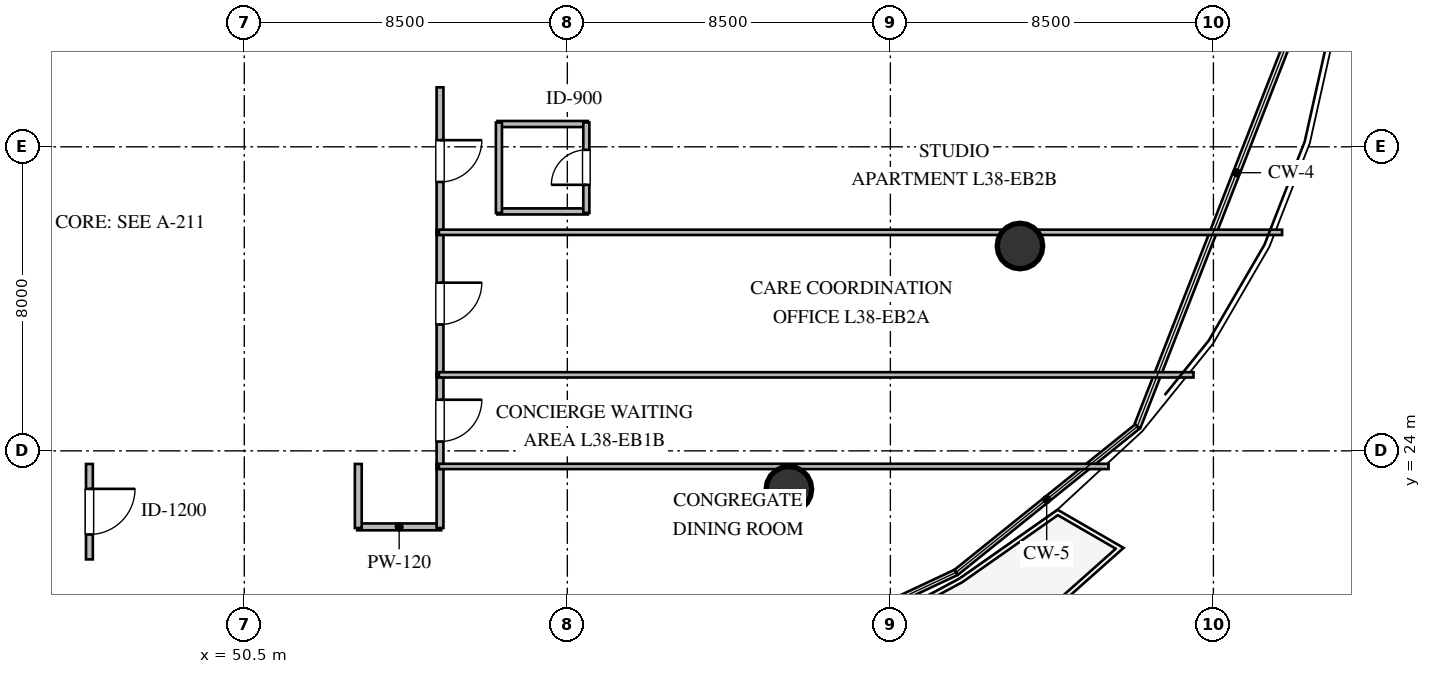
"""IFC4 building model, lengths in metres.
Left out: names, types, materials, properties, quantities, classifications, styles, units other than length and angle.
Written with IfcOpenShell. Run it as: python <this file> out.ifc"""

import sys

from ifc_helpers import new_model, si_unit, direction, frame, frame_2d, origin, origin_2d, place, context, subcontext, project, spatial, rectangle, circle, extrude, element, fill, save


model = new_model("IFC4")
c1 = context("Model", 3, precision=1e-05, world=origin(), true_north=direction((0.0, 1.0)))
c2 = subcontext(c1, "Body", "Model", "MODEL_VIEW")
j1 = project(units=[si_unit("LENGTHUNIT", "METRE"), si_unit("PLANEANGLEUNIT", "RADIAN")], contexts=[c1])
p1 = place(None, origin())
s1 = spatial("IfcSite", under=j1, at=p1, CompositionType="ELEMENT")
p2 = place(p1, origin())
s2 = spatial("IfcBuilding", under=s1, at=p2, CompositionType="ELEMENT")
p3 = place(p2, frame((0.0, 0.0, 145.8)))
s3 = spatial("IfcBuildingStorey", under=s2, at=p3, CompositionType="ELEMENT", Elevation=145.8)
for number, where, z_axis, x_axis in (
    (1, (64.83, 22.99, 0.0), (0.0, 0.0, 1.0), (1.0, 0.0, 0.0)),
    (2, (70.91, 29.39, 0.0), (0.0, 0.0, 1.0), (1.0, 0.0, 0.0)),
):
    element("IfcColumn", number, at=place(p3, frame(where, z_axis=z_axis, x_axis=x_axis)), inside=s3, PredefinedType="COLUMN", context=c2, shape_type="SweptSolid", body=[
        extrude(circle(Radius=0.6, at=origin_2d()), origin(), (0.0, 0.0, 1.0), 3.6),
    ])
for number, where, z_axis, x_axis in (
    (3, (57.16, 30.3, 0.0), (0.0, 0.0, 1.0), (1.0, 0.0, 0.0)),
    (4, (57.16, 32.6, 0.0), (0.0, 0.0, 1.0), (1.0, 0.0, 0.0)),
):
    element("IfcWall", number, at=place(p3, frame(where, z_axis=z_axis, x_axis=x_axis)), inside=s3, PredefinedType="PLUMBINGWALL", context=c2, shape_type="SweptSolid", body=[
        extrude(rectangle(XDim=2.38, YDim=0.16, at=frame_2d((1.19, 0.0))), origin(), (0.0, 0.0, 1.0), 3.36),
    ])
p4 = place(p3, frame((57.2, 30.26, 0.0), z_axis=(0.0, 0.0, 1.0), x_axis=(0.0, 1.0, 0.0)))
e5 = element("IfcWall", 5, at=p4, inside=s3, PredefinedType="PLUMBINGWALL", context=c2, shape_type="SweptSolid", body=[
    extrude(rectangle(XDim=2.38, YDim=0.16, at=frame_2d((1.19, 0.0))), origin(), (0.0, 0.0, 1.0), 3.36),
])
p5 = place(p3, frame((59.5, 30.26, 0.0), z_axis=(0.0, 0.0, 1.0), x_axis=(0.0, 1.0, 0.0)))
e6 = element("IfcWall", 6, at=p5, inside=s3, PredefinedType="PLUMBINGWALL", context=c2, shape_type="SweptSolid", body=[
    extrude(rectangle(XDim=2.38, YDim=0.16, at=frame_2d((1.19, 0.0))), origin(), (0.0, 0.0, 1.0), 2.996),
])
p6 = place(p5, frame((0.74, 0.0, 0.0)))
e7 = element("IfcOpeningElement", 7, at=p6, cuts=e6, PredefinedType="OPENING", context=c2, shape_type="SweptSolid", body=[
    extrude(rectangle(XDim=0.92, YDim=2.1, at=frame_2d((0.46, 1.05))), frame((0.0, 0.09, 0.0), z_axis=(0.0, -1.0, 0.0), x_axis=(1.0, 0.0, 0.0)), (0.0, 0.0, 1.0), 0.18),
])
p7 = place(p3, frame((46.425, 23.655, 0.0), z_axis=(0.0, 0.0, 1.0), x_axis=(0.0, -1.0, 0.0)))
e8 = element("IfcWall", 8, at=p7, inside=s3, PredefinedType="PARTITIONING", context=c2, shape_type="SweptSolid", body=[
    extrude(rectangle(XDim=2.51, YDim=0.18, at=frame_2d((1.255, 0.0))), origin(), (0.0, 0.0, 1.0), 3.36),
])
p8 = place(p7, frame((0.655, 0.0, 0.0)))
e9 = element("IfcOpeningElement", 9, at=p8, cuts=e8, PredefinedType="OPENING", context=c2, shape_type="SweptSolid", body=[
    extrude(rectangle(XDim=1.2, YDim=2.15, at=frame_2d((0.6, 1.075))), frame((0.0, 0.1, 0.0), z_axis=(0.0, -1.0, 0.0), x_axis=(1.0, 0.0, 0.0)), (0.0, 0.0, 1.0), 0.2),
])
p9 = place(p3, frame((55.68, 22.0, 0.0), z_axis=(0.0, 0.0, 1.0), x_axis=(-1.0, 0.0, 0.0)))
e10 = element("IfcWall", 10, at=p9, inside=s3, PredefinedType="PARTITIONING", context=c2, shape_type="SweptSolid", body=[
    extrude(rectangle(XDim=2.21, YDim=0.18, at=frame_2d((1.105, 0.0))), origin(), (0.0, 0.0, 1.0), 3.36),
])
for number, where, z_axis, x_axis in (
    (11, (55.65, 23.655, 0.0), (0.0, 0.0, 1.0), (0.0, -1.0, 0.0)),
    (12, (53.5, 21.97, 0.0), (0.0, 0.0, 1.0), (0.0, 1.0, 0.0)),
):
    element("IfcWall", number, at=place(p3, frame(where, z_axis=z_axis, x_axis=x_axis)), inside=s3, PredefinedType="PARTITIONING", context=c2, shape_type="SweptSolid", body=[
        extrude(rectangle(XDim=1.685, YDim=0.18, at=frame_2d((0.843, 0.0))), origin(), (0.0, 0.0, 1.0), 3.36),
    ])
p10 = place(p3, frame((55.65, 26.065, 0.0), z_axis=(0.0, 0.0, 1.0), x_axis=(0.0, -1.0, 0.0)))
e13 = element("IfcWall", 13, at=p10, inside=s3, PredefinedType="PARTITIONING", context=c2, shape_type="SweptSolid", body=[
    extrude(rectangle(XDim=2.54, YDim=0.18, at=frame_2d((1.27, 0.0))), origin(), (0.0, 0.0, 1.0), 3.36),
])
p11 = place(p10, frame((0.72, 0.0, 0.0)))
e14 = element("IfcOpeningElement", 14, at=p11, cuts=e13, PredefinedType="OPENING", context=c2, shape_type="SweptSolid", body=[
    extrude(rectangle(XDim=1.1, YDim=2.1, at=frame_2d((0.55, 1.05))), frame((0.0, 0.1, 0.0), z_axis=(0.0, -1.0, 0.0), x_axis=(1.0, 0.0, 0.0)), (0.0, 0.0, 1.0), 0.2),
])
p12 = place(p3, frame((55.65, 29.815, 0.0), z_axis=(0.0, 0.0, 1.0), x_axis=(0.0, -1.0, 0.0)))
e15 = element("IfcWall", 15, at=p12, inside=s3, PredefinedType="PARTITIONING", context=c2, shape_type="SweptSolid", body=[
    extrude(rectangle(XDim=3.88, YDim=0.18, at=frame_2d((1.94, 0.0))), origin(), (0.0, 0.0, 1.0), 3.36),
])
p13 = place(p12, frame((1.39, 0.0, 0.0)))
e16 = element("IfcOpeningElement", 16, at=p13, cuts=e15, PredefinedType="OPENING", context=c2, shape_type="SweptSolid", body=[
    extrude(rectangle(XDim=1.1, YDim=2.1, at=frame_2d((0.55, 1.05))), frame((0.0, 0.1, 0.0), z_axis=(0.0, -1.0, 0.0), x_axis=(1.0, 0.0, 0.0)), (0.0, 0.0, 1.0), 0.2),
])
p14 = place(p3, frame((55.65, 33.565, 0.0), z_axis=(0.0, 0.0, 1.0), x_axis=(0.0, -1.0, 0.0)))
e17 = element("IfcWall", 17, at=p14, inside=s3, PredefinedType="PARTITIONING", context=c2, shape_type="SweptSolid", body=[
    extrude(rectangle(XDim=3.88, YDim=0.18, at=frame_2d((1.94, 0.0))), origin(), (0.0, 0.0, 1.0), 3.36),
])
p15 = place(p14, frame((1.39, 0.0, 0.0)))
e18 = element("IfcOpeningElement", 18, at=p15, cuts=e17, PredefinedType="OPENING", context=c2, shape_type="SweptSolid", body=[
    extrude(rectangle(XDim=1.1, YDim=2.1, at=frame_2d((0.55, 1.05))), frame((0.0, 0.1, 0.0), z_axis=(0.0, -1.0, 0.0), x_axis=(1.0, 0.0, 0.0)), (0.0, 0.0, 1.0), 0.2),
])
p16 = place(p3, frame((55.62, 23.59, 0.0), z_axis=(0.0, 0.0, 1.0), x_axis=(1.0, 0.0, 0.0)))
e19 = element("IfcWall", 19, at=p16, inside=s3, PredefinedType="PARTITIONING", context=c2, shape_type="SweptSolid", body=[
    extrude(rectangle(XDim=17.621, YDim=0.14, at=frame_2d((8.811, 0.0))), origin(), (0.0, 0.0, 1.0), 2.806),
])
p17 = place(p3, frame((55.62, 26.0, 0.0), z_axis=(0.0, 0.0, 1.0), x_axis=(1.0, 0.0, 0.0)))
e20 = element("IfcWall", 20, at=p17, inside=s3, PredefinedType="PARTITIONING", context=c2, shape_type="SweptSolid", body=[
    extrude(rectangle(XDim=19.856, YDim=0.14, at=frame_2d((9.928, 0.0))), origin(), (0.0, 0.0, 1.0), 2.806),
])
p18 = place(p3, frame((55.62, 29.75, 0.0), z_axis=(0.0, 0.0, 1.0), x_axis=(1.0, 0.0, 0.0)))
e21 = element("IfcWall", 21, at=p18, inside=s3, PredefinedType="PARTITIONING", context=c2, shape_type="SweptSolid", body=[
    extrude(rectangle(XDim=22.187, YDim=0.14, at=frame_2d((11.093, 0.0))), origin(), (0.0, 0.0, 1.0), 2.806),
])
p19 = place(p6, origin())
e22 = element("IfcDoor", 22, at=p19, inside=s3, OperationType="SINGLE_SWING_LEFT", PredefinedType="DOOR", context=c2, shape_type="SweptSolid", body=[
    extrude(rectangle(XDim=0.92, YDim=2.1, at=frame_2d((0.46, 1.05))), frame((0.0, 0.025, 0.0), z_axis=(0.0, -1.0, 0.0), x_axis=(1.0, 0.0, 0.0)), (0.0, 0.0, 1.0), 0.05),
])
fill(e7, e22)
p20 = place(p8, origin())
e23 = element("IfcDoor", 23, at=p20, inside=s3, OperationType="SINGLE_SWING_LEFT", PredefinedType="DOOR", context=c2, shape_type="SweptSolid", body=[
    extrude(rectangle(XDim=1.2, YDim=2.15, at=frame_2d((0.6, 1.075))), frame((0.0, 0.025, 0.0), z_axis=(0.0, -1.0, 0.0), x_axis=(1.0, 0.0, 0.0)), (0.0, 0.0, 1.0), 0.05),
])
fill(e9, e23)
p21 = place(p11, origin())
e24 = element("IfcDoor", 24, at=p21, inside=s3, OperationType="SINGLE_SWING_LEFT", PredefinedType="DOOR", context=c2, shape_type="SweptSolid", body=[
    extrude(rectangle(XDim=1.1, YDim=2.1, at=frame_2d((0.55, 1.05))), frame((0.0, 0.025, 0.0), z_axis=(0.0, -1.0, 0.0), x_axis=(1.0, 0.0, 0.0)), (0.0, 0.0, 1.0), 0.05),
])
fill(e14, e24)
p22 = place(p13, origin())
e25 = element("IfcDoor", 25, at=p22, inside=s3, OperationType="SINGLE_SWING_LEFT", PredefinedType="DOOR", context=c2, shape_type="SweptSolid", body=[
    extrude(rectangle(XDim=1.1, YDim=2.1, at=frame_2d((0.55, 1.05))), frame((0.0, 0.025, 0.0), z_axis=(0.0, -1.0, 0.0), x_axis=(1.0, 0.0, 0.0)), (0.0, 0.0, 1.0), 0.05),
])
fill(e16, e25)
p23 = place(p15, origin())
e26 = element("IfcDoor", 26, at=p23, inside=s3, OperationType="SINGLE_SWING_LEFT", PredefinedType="DOOR", context=c2, shape_type="SweptSolid", body=[
    extrude(rectangle(XDim=1.1, YDim=2.1, at=frame_2d((0.55, 1.05))), frame((0.0, 0.025, 0.0), z_axis=(0.0, -1.0, 0.0), x_axis=(1.0, 0.0, 0.0)), (0.0, 0.0, 1.0), 0.05),
])
fill(e18, e26)
save(model, sys.argv[1])
